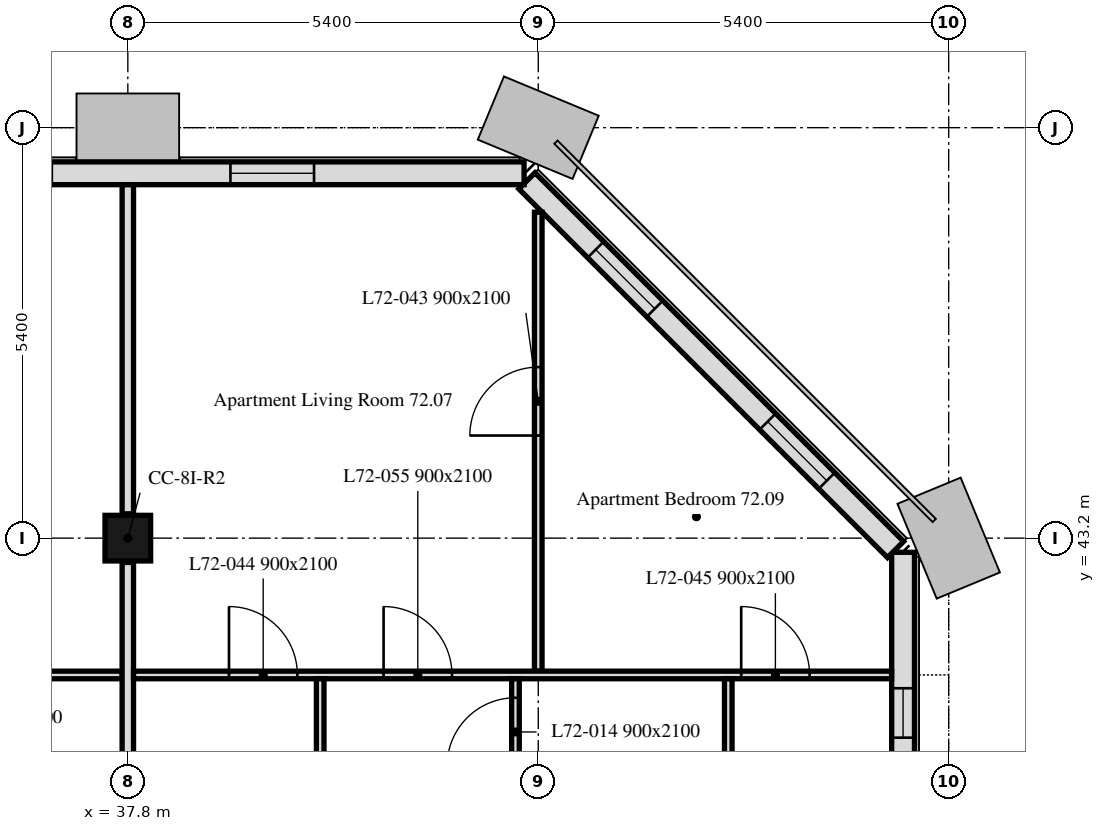
"""IFC4 building model, lengths in metres.
Left out: names, types, materials, properties, quantities, classifications, styles, units other than length and angle.
Written with IfcOpenShell. Run it as: python <this file> out.ifc"""

import sys

from ifc_helpers import new_model, si_unit, direction, frame, frame_2d, origin, origin_2d, place, context, subcontext, project, spatial, rectangle, extrude, element, fill, save


model = new_model("IFC4")
c1 = context("Model", 3, precision=1e-05, world=origin(), true_north=direction((0.0, 1.0)))
c2 = subcontext(c1, "Body", "Model", "MODEL_VIEW")
j1 = project(units=[si_unit("LENGTHUNIT", "METRE"), si_unit("PLANEANGLEUNIT", "RADIAN")], contexts=[c1])
p1 = place(None, origin())
s1 = spatial("IfcSite", under=j1, at=p1, CompositionType="ELEMENT")
p2 = place(p1, origin())
s2 = spatial("IfcBuilding", under=s1, at=p2, CompositionType="ELEMENT")
p3 = place(p2, frame((0.0, 0.0, 291.7)))
s3 = spatial("IfcBuildingStorey", under=s2, at=p3, CompositionType="ELEMENT", Elevation=291.7)
p4 = place(p3, frame((37.8, 43.2, 0.0), z_axis=(0.0, 0.0, 1.0), x_axis=(1.0, 0.0, 0.0)))
e1 = element("IfcColumn", 1, at=p4, inside=s3, PredefinedType="COLUMN", context=c2, shape_type="SweptSolid", body=[
    extrude(rectangle(XDim=0.6, YDim=0.6, at=origin_2d()), origin(), (0.0, 0.0, 1.0), 3.0),
])
p5 = place(p3, frame((48.0, 10.986, 0.0), z_axis=(0.0, 0.0, 1.0), x_axis=(0.0, 1.0, 0.0)))
e2 = element("IfcWall", 2, at=p5, inside=s3, PredefinedType="SOLIDWALL", context=c2, shape_type="SweptSolid", body=[
    extrude(rectangle(XDim=32.027, YDim=0.3, at=frame_2d((16.014, 0.0))), origin(), (0.0, 0.0, 1.0), 3.0),
])
p6 = place(p5, frame((1.164, 0.0, 0.9)))
e3 = element("IfcOpeningElement", 3, at=p6, cuts=e2, PredefinedType="OPENING", context=c2, shape_type="SweptSolid", body=[
    extrude(rectangle(XDim=1.1, YDim=1.7, at=frame_2d((0.55, 0.85))), frame((0.0, 0.16, 0.0), z_axis=(0.0, -1.0, 0.0), x_axis=(1.0, 0.0, 0.0)), (0.0, 0.0, 1.0), 0.32),
])
p7 = place(p5, frame((3.114, 0.0, 0.9)))
e4 = element("IfcOpeningElement", 4, at=p7, cuts=e2, PredefinedType="OPENING", context=c2, shape_type="SweptSolid", body=[
    extrude(rectangle(XDim=1.1, YDim=1.7, at=frame_2d((0.55, 0.85))), frame((0.0, 0.16, 0.0), z_axis=(0.0, -1.0, 0.0), x_axis=(1.0, 0.0, 0.0)), (0.0, 0.0, 1.0), 0.32),
])
p8 = place(p5, frame((6.214, 0.0, 0.9)))
e5 = element("IfcOpeningElement", 5, at=p8, cuts=e2, PredefinedType="OPENING", context=c2, shape_type="SweptSolid", body=[
    extrude(rectangle(XDim=3.4, YDim=1.7, at=frame_2d((1.7, 0.85))), frame((0.0, 0.16, 0.0), z_axis=(0.0, -1.0, 0.0), x_axis=(1.0, 0.0, 0.0)), (0.0, 0.0, 1.0), 0.32),
])
p9 = place(p5, frame((11.964, 0.0, 0.9)))
e6 = element("IfcOpeningElement", 6, at=p9, cuts=e2, PredefinedType="OPENING", context=c2, shape_type="SweptSolid", body=[
    extrude(rectangle(XDim=1.1, YDim=1.7, at=frame_2d((0.55, 0.85))), frame((0.0, 0.16, 0.0), z_axis=(0.0, -1.0, 0.0), x_axis=(1.0, 0.0, 0.0)), (0.0, 0.0, 1.0), 0.32),
])
p10 = place(p5, frame((13.564, 0.0, 0.9)))
e7 = element("IfcOpeningElement", 7, at=p10, cuts=e2, PredefinedType="OPENING", context=c2, shape_type="SweptSolid", body=[
    extrude(rectangle(XDim=1.1, YDim=1.7, at=frame_2d((0.55, 0.85))), frame((0.0, 0.16, 0.0), z_axis=(0.0, -1.0, 0.0), x_axis=(1.0, 0.0, 0.0)), (0.0, 0.0, 1.0), 0.32),
])
p11 = place(p5, frame((17.014, 0.0, 0.9)))
e8 = element("IfcOpeningElement", 8, at=p11, cuts=e2, PredefinedType="OPENING", context=c2, shape_type="SweptSolid", body=[
    extrude(rectangle(XDim=3.4, YDim=1.7, at=frame_2d((1.7, 0.85))), frame((0.0, 0.16, 0.0), z_axis=(0.0, -1.0, 0.0), x_axis=(1.0, 0.0, 0.0)), (0.0, 0.0, 1.0), 0.32),
])
p12 = place(p5, frame((22.839, 0.0, 0.9)))
e9 = element("IfcOpeningElement", 9, at=p12, cuts=e2, PredefinedType="OPENING", context=c2, shape_type="SweptSolid", body=[
    extrude(rectangle(XDim=0.65, YDim=1.7, at=frame_2d((0.325, 0.85))), frame((0.0, 0.16, 0.0), z_axis=(0.0, -1.0, 0.0), x_axis=(1.0, 0.0, 0.0)), (0.0, 0.0, 1.0), 0.32),
])
p13 = place(p5, frame((24.364, 0.0, 0.9)))
e10 = element("IfcOpeningElement", 10, at=p13, cuts=e2, PredefinedType="OPENING", context=c2, shape_type="SweptSolid", body=[
    extrude(rectangle(XDim=1.1, YDim=1.7, at=frame_2d((0.55, 0.85))), frame((0.0, 0.16, 0.0), z_axis=(0.0, -1.0, 0.0), x_axis=(1.0, 0.0, 0.0)), (0.0, 0.0, 1.0), 0.32),
])
p14 = place(p5, frame((28.164, 0.0, 0.9)))
e11 = element("IfcOpeningElement", 11, at=p14, cuts=e2, PredefinedType="OPENING", context=c2, shape_type="SweptSolid", body=[
    extrude(rectangle(XDim=1.1, YDim=1.7, at=frame_2d((0.55, 0.85))), frame((0.0, 0.16, 0.0), z_axis=(0.0, -1.0, 0.0), x_axis=(1.0, 0.0, 0.0)), (0.0, 0.0, 1.0), 0.32),
])
p15 = place(p5, frame((29.589, 0.0, 0.9)))
e12 = element("IfcOpeningElement", 12, at=p15, cuts=e2, PredefinedType="OPENING", context=c2, shape_type="SweptSolid", body=[
    extrude(rectangle(XDim=0.65, YDim=1.7, at=frame_2d((0.325, 0.85))), frame((0.0, 0.16, 0.0), z_axis=(0.0, -1.0, 0.0), x_axis=(1.0, 0.0, 0.0)), (0.0, 0.0, 1.0), 0.32),
])
p16 = place(p3, frame((47.901, 43.051, 0.0), z_axis=(0.0, 0.0, 1.0), x_axis=(-0.707106781187, 0.707106781187, 0.0)))
e13 = element("IfcWall", 13, at=p16, inside=s3, PredefinedType="SOLIDWALL", context=c2, shape_type="SweptSolid", body=[
    extrude(rectangle(XDim=6.86, YDim=0.3, at=frame_2d((3.43, 0.0))), origin(), (0.0, 0.0, 1.0), 3.0),
])
p17 = place(p16, frame((1.28, 0.0, 0.9)))
e14 = element("IfcOpeningElement", 14, at=p17, cuts=e13, PredefinedType="OPENING", context=c2, shape_type="SweptSolid", body=[
    extrude(rectangle(XDim=1.1, YDim=1.7, at=frame_2d((0.55, 0.85))), frame((0.0, 0.16, 0.0), z_axis=(0.0, -1.0, 0.0), x_axis=(1.0, 0.0, 0.0)), (0.0, 0.0, 1.0), 0.32),
])
p18 = place(p16, frame((4.48, 0.0, 0.9)))
e15 = element("IfcOpeningElement", 15, at=p18, cuts=e13, PredefinedType="OPENING", context=c2, shape_type="SweptSolid", body=[
    extrude(rectangle(XDim=1.1, YDim=1.7, at=frame_2d((0.55, 0.85))), frame((0.0, 0.16, 0.0), z_axis=(0.0, -1.0, 0.0), x_axis=(1.0, 0.0, 0.0)), (0.0, 0.0, 1.0), 0.32),
])
p19 = place(p3, frame((43.014, 48.0, 0.0), z_axis=(0.0, 0.0, 1.0), x_axis=(-1.0, 0.0, 0.0)))
e16 = element("IfcWall", 16, at=p19, inside=s3, PredefinedType="SOLIDWALL", context=c2, shape_type="SweptSolid", body=[
    extrude(rectangle(XDim=32.027, YDim=0.3, at=frame_2d((16.014, 0.0))), origin(), (0.0, 0.0, 1.0), 3.0),
])
p20 = place(p19, frame((2.764, 0.0, 0.9)))
e17 = element("IfcOpeningElement", 17, at=p20, cuts=e16, PredefinedType="OPENING", context=c2, shape_type="SweptSolid", body=[
    extrude(rectangle(XDim=1.1, YDim=1.7, at=frame_2d((0.55, 0.85))), frame((0.0, 0.16, 0.0), z_axis=(0.0, -1.0, 0.0), x_axis=(1.0, 0.0, 0.0)), (0.0, 0.0, 1.0), 0.32),
])
p21 = place(p19, frame((6.214, 0.0, 0.9)))
e18 = element("IfcOpeningElement", 18, at=p21, cuts=e16, PredefinedType="OPENING", context=c2, shape_type="SweptSolid", body=[
    extrude(rectangle(XDim=3.4, YDim=1.7, at=frame_2d((1.7, 0.85))), frame((0.0, 0.16, 0.0), z_axis=(0.0, -1.0, 0.0), x_axis=(1.0, 0.0, 0.0)), (0.0, 0.0, 1.0), 0.32),
])
p22 = place(p19, frame((13.564, 0.0, 0.9)))
e19 = element("IfcOpeningElement", 19, at=p22, cuts=e16, PredefinedType="OPENING", context=c2, shape_type="SweptSolid", body=[
    extrude(rectangle(XDim=1.1, YDim=1.7, at=frame_2d((0.55, 0.85))), frame((0.0, 0.16, 0.0), z_axis=(0.0, -1.0, 0.0), x_axis=(1.0, 0.0, 0.0)), (0.0, 0.0, 1.0), 0.32),
])
p23 = place(p19, frame((17.014, 0.0, 0.9)))
e20 = element("IfcOpeningElement", 20, at=p23, cuts=e16, PredefinedType="OPENING", context=c2, shape_type="SweptSolid", body=[
    extrude(rectangle(XDim=3.4, YDim=1.7, at=frame_2d((1.7, 0.85))), frame((0.0, 0.16, 0.0), z_axis=(0.0, -1.0, 0.0), x_axis=(1.0, 0.0, 0.0)), (0.0, 0.0, 1.0), 0.32),
])
p24 = place(p19, frame((24.364, 0.0, 0.9)))
e21 = element("IfcOpeningElement", 21, at=p24, cuts=e16, PredefinedType="OPENING", context=c2, shape_type="SweptSolid", body=[
    extrude(rectangle(XDim=1.1, YDim=1.7, at=frame_2d((0.55, 0.85))), frame((0.0, 0.16, 0.0), z_axis=(0.0, -1.0, 0.0), x_axis=(1.0, 0.0, 0.0)), (0.0, 0.0, 1.0), 0.32),
])
p25 = place(p19, frame((27.814, 0.0, 0.9)))
e22 = element("IfcOpeningElement", 22, at=p25, cuts=e16, PredefinedType="OPENING", context=c2, shape_type="SweptSolid", body=[
    extrude(rectangle(XDim=3.4, YDim=1.7, at=frame_2d((1.7, 0.85))), frame((0.0, 0.16, 0.0), z_axis=(0.0, -1.0, 0.0), x_axis=(1.0, 0.0, 0.0)), (0.0, 0.0, 1.0), 0.32),
])
p26 = place(p3, frame((32.37, 41.4, 0.0), z_axis=(0.0, 0.0, 1.0), x_axis=(1.0, 0.0, 0.0)))
e23 = element("IfcWall", 23, at=p26, inside=s3, PredefinedType="PARTITIONING", context=c2, shape_type="SweptSolid", body=[
    extrude(rectangle(XDim=5.355, YDim=0.1, at=frame_2d((2.677, 0.0))), origin(), (0.0, 0.0, 1.0), 3.0),
])
p27 = place(p26, frame((2.578, 0.0, 0.0)))
e24 = element("IfcOpeningElement", 24, at=p27, cuts=e23, PredefinedType="OPENING", context=c2, shape_type="SweptSolid", body=[
    extrude(rectangle(XDim=0.9, YDim=2.1, at=frame_2d((0.45, 1.05))), frame((0.0, 0.05, 0.0), z_axis=(0.0, -1.0, 0.0), x_axis=(1.0, 0.0, 0.0)), (0.0, 0.0, 1.0), 0.1),
])
p28 = place(p3, frame((37.8, 43.52, 0.0), z_axis=(0.0, 0.0, 1.0), x_axis=(0.0, 1.0, 0.0)))
e25 = element("IfcWall", 25, at=p28, inside=s3, PredefinedType="PARTITIONING", context=c2, shape_type="SweptSolid", body=[
    extrude(rectangle(XDim=4.329, YDim=0.15, at=frame_2d((2.165, 0.0))), origin(), (0.0, 0.0, 1.0), 2.4),
])
p29 = place(p3, frame((37.8, 38.12, 0.0), z_axis=(0.0, 0.0, 1.0), x_axis=(0.0, 1.0, 0.0)))
e26 = element("IfcWall", 26, at=p29, inside=s3, PredefinedType="PARTITIONING", context=c2, shape_type="SweptSolid", body=[
    extrude(rectangle(XDim=4.76, YDim=0.15, at=frame_2d((2.38, 0.0))), origin(), (0.0, 0.0, 1.0), 2.4),
])
p30 = place(p3, frame((43.2, 41.45, 0.0), z_axis=(0.0, 0.0, 1.0), x_axis=(0.0, 1.0, 0.0)))
e27 = element("IfcWall", 27, at=p30, inside=s3, PredefinedType="PARTITIONING", context=c2, shape_type="SweptSolid", body=[
    extrude(rectangle(XDim=6.038, YDim=0.1, at=frame_2d((3.019, 0.0))), origin(), (0.0, 0.0, 1.0), 3.0),
])
p31 = place(p30, frame((3.1, 0.0, 0.0)))
e28 = element("IfcOpeningElement", 28, at=p31, cuts=e27, PredefinedType="OPENING", context=c2, shape_type="SweptSolid", body=[
    extrude(rectangle(XDim=0.9, YDim=2.1, at=frame_2d((0.45, 1.05))), frame((0.0, 0.05, 0.0), z_axis=(0.0, -1.0, 0.0), x_axis=(1.0, 0.0, 0.0)), (0.0, 0.0, 1.0), 0.1),
])
p32 = place(p3, frame((37.875, 41.4, 0.0), z_axis=(0.0, 0.0, 1.0), x_axis=(1.0, 0.0, 0.0)))
e29 = element("IfcWall", 29, at=p32, inside=s3, PredefinedType="PARTITIONING", context=c2, shape_type="SweptSolid", body=[
    extrude(rectangle(XDim=9.974, YDim=0.1, at=frame_2d((4.987, 0.0))), origin(), (0.0, 0.0, 1.0), 3.0),
])
p33 = place(p32, frame((1.256, 0.0, 0.0)))
e30 = element("IfcOpeningElement", 30, at=p33, cuts=e29, PredefinedType="OPENING", context=c2, shape_type="SweptSolid", body=[
    extrude(rectangle(XDim=0.9, YDim=2.1, at=frame_2d((0.45, 1.05))), frame((0.0, 0.05, 0.0), z_axis=(0.0, -1.0, 0.0), x_axis=(1.0, 0.0, 0.0)), (0.0, 0.0, 1.0), 0.1),
])
p34 = place(p32, frame((7.995, 0.0, 0.0)))
e31 = element("IfcOpeningElement", 31, at=p34, cuts=e29, PredefinedType="OPENING", context=c2, shape_type="SweptSolid", body=[
    extrude(rectangle(XDim=0.9, YDim=2.1, at=frame_2d((0.45, 1.05))), frame((0.0, 0.05, 0.0), z_axis=(0.0, -1.0, 0.0), x_axis=(1.0, 0.0, 0.0)), (0.0, 0.0, 1.0), 0.1),
])
p35 = place(p32, frame((3.29, 0.0, 0.0)))
e32 = element("IfcOpeningElement", 32, at=p35, cuts=e29, PredefinedType="OPENING", context=c2, shape_type="SweptSolid", body=[
    extrude(rectangle(XDim=0.9, YDim=2.1, at=frame_2d((0.45, 1.05))), frame((0.0, 0.05, 0.0), z_axis=(0.0, -1.0, 0.0), x_axis=(1.0, 0.0, 0.0)), (0.0, 0.0, 1.0), 0.1),
])
p36 = place(p3, frame((40.331, 34.725, 0.0), z_axis=(0.0, 0.0, 1.0), x_axis=(0.0, 1.0, 0.0)))
e33 = element("IfcWall", 33, at=p36, inside=s3, PredefinedType="PARTITIONING", context=c2, shape_type="SweptSolid", body=[
    extrude(rectangle(XDim=6.625, YDim=0.1, at=frame_2d((3.312, 0.0))), origin(), (0.0, 0.0, 1.0), 2.4),
])
p37 = place(p36, frame((0.725, 0.0, 0.0)))
e34 = element("IfcOpeningElement", 34, at=p37, cuts=e33, PredefinedType="OPENING", context=c2, shape_type="SweptSolid", body=[
    extrude(rectangle(XDim=0.9, YDim=2.1, at=frame_2d((0.45, 1.05))), frame((0.0, 0.05, 0.0), z_axis=(0.0, -1.0, 0.0), x_axis=(1.0, 0.0, 0.0)), (0.0, 0.0, 1.0), 0.1),
])
p38 = place(p36, frame((4.329, 0.0, 0.0)))
e35 = element("IfcOpeningElement", 35, at=p38, cuts=e33, PredefinedType="OPENING", context=c2, shape_type="SweptSolid", body=[
    extrude(rectangle(XDim=0.9, YDim=2.1, at=frame_2d((0.45, 1.05))), frame((0.0, 0.05, 0.0), z_axis=(0.0, -1.0, 0.0), x_axis=(1.0, 0.0, 0.0)), (0.0, 0.0, 1.0), 0.1),
])
p39 = place(p3, frame((42.9, 38.12, 0.0), z_axis=(0.0, 0.0, 1.0), x_axis=(0.0, 1.0, 0.0)))
e36 = element("IfcWall", 36, at=p39, inside=s3, PredefinedType="PARTITIONING", context=c2, shape_type="SweptSolid", body=[
    extrude(rectangle(XDim=3.23, YDim=0.1, at=frame_2d((1.615, 0.0))), origin(), (0.0, 0.0, 1.0), 3.0),
])
p40 = place(p39, frame((2.08, 0.0, 0.0)))
e37 = element("IfcOpeningElement", 37, at=p40, cuts=e36, PredefinedType="OPENING", context=c2, shape_type="SweptSolid", body=[
    extrude(rectangle(XDim=0.9, YDim=2.1, at=frame_2d((0.45, 1.05))), frame((0.0, 0.05, 0.0), z_axis=(0.0, -1.0, 0.0), x_axis=(1.0, 0.0, 0.0)), (0.0, 0.0, 1.0), 0.1),
])
p41 = place(p3, frame((45.7, 37.2, 0.0), z_axis=(0.0, 0.0, 1.0), x_axis=(0.0, 1.0, 0.0)))
e38 = element("IfcWall", 38, at=p41, inside=s3, PredefinedType="PARTITIONING", context=c2, shape_type="SweptSolid", body=[
    extrude(rectangle(XDim=4.15, YDim=0.1, at=frame_2d((2.075, 0.0))), origin(), (0.0, 0.0, 1.0), 2.4),
])
p42 = place(p15, origin())
e39 = element("IfcWindow", 39, at=p42, inside=s3, PartitioningType="SINGLE_PANEL", PredefinedType="WINDOW", context=c2, shape_type="SweptSolid", body=[
    extrude(rectangle(XDim=0.65, YDim=1.7, at=frame_2d((0.325, 0.85))), frame((0.0, 0.03, 0.0), z_axis=(0.0, -1.0, 0.0), x_axis=(1.0, 0.0, 0.0)), (0.0, 0.0, 1.0), 0.06),
])
fill(e12, e39)
p43 = place(p17, origin())
e40 = element("IfcWindow", 40, at=p43, inside=s3, PartitioningType="SINGLE_PANEL", PredefinedType="WINDOW", context=c2, shape_type="SweptSolid", body=[
    extrude(rectangle(XDim=1.1, YDim=1.7, at=frame_2d((0.55, 0.85))), frame((0.0, 0.03, 0.0), z_axis=(0.0, -1.0, 0.0), x_axis=(1.0, 0.0, 0.0)), (0.0, 0.0, 1.0), 0.06),
])
fill(e14, e40)
p44 = place(p18, origin())
e41 = element("IfcWindow", 41, at=p44, inside=s3, PartitioningType="SINGLE_PANEL", PredefinedType="WINDOW", context=c2, shape_type="SweptSolid", body=[
    extrude(rectangle(XDim=1.1, YDim=1.7, at=frame_2d((0.55, 0.85))), frame((0.0, 0.03, 0.0), z_axis=(0.0, -1.0, 0.0), x_axis=(1.0, 0.0, 0.0)), (0.0, 0.0, 1.0), 0.06),
])
fill(e15, e41)
p45 = place(p20, origin())
e42 = element("IfcWindow", 42, at=p45, inside=s3, PartitioningType="SINGLE_PANEL", PredefinedType="WINDOW", context=c2, shape_type="SweptSolid", body=[
    extrude(rectangle(XDim=1.1, YDim=1.7, at=frame_2d((0.55, 0.85))), frame((0.0, 0.03, 0.0), z_axis=(0.0, -1.0, 0.0), x_axis=(1.0, 0.0, 0.0)), (0.0, 0.0, 1.0), 0.06),
])
fill(e17, e42)
p46 = place(p40, origin())
e43 = element("IfcDoor", 43, at=p46, inside=s3, OperationType="SINGLE_SWING_LEFT", PredefinedType="DOOR", context=c2, shape_type="SweptSolid", body=[
    extrude(rectangle(XDim=0.9, YDim=2.1, at=frame_2d((0.45, 1.05))), frame((0.0, 0.025, 0.0), z_axis=(0.0, -1.0, 0.0), x_axis=(1.0, 0.0, 0.0)), (0.0, 0.0, 1.0), 0.05),
])
fill(e37, e43)
p47 = place(p31, origin())
e44 = element("IfcDoor", 44, at=p47, inside=s3, OperationType="SINGLE_SWING_RIGHT", PredefinedType="DOOR", context=c2, shape_type="SweptSolid", body=[
    extrude(rectangle(XDim=0.9, YDim=2.1, at=frame_2d((0.45, 1.05))), frame((0.0, 0.025, 0.0), z_axis=(0.0, -1.0, 0.0), x_axis=(1.0, 0.0, 0.0)), (0.0, 0.0, 1.0), 0.05),
])
fill(e28, e44)
p48 = place(p33, origin())
e45 = element("IfcDoor", 45, at=p48, inside=s3, OperationType="SINGLE_SWING_RIGHT", PredefinedType="DOOR", context=c2, shape_type="SweptSolid", body=[
    extrude(rectangle(XDim=0.9, YDim=2.1, at=frame_2d((0.45, 1.05))), frame((0.0, 0.025, 0.0), z_axis=(0.0, -1.0, 0.0), x_axis=(1.0, 0.0, 0.0)), (0.0, 0.0, 1.0), 0.05),
])
fill(e30, e45)
p49 = place(p34, origin())
e46 = element("IfcDoor", 46, at=p49, inside=s3, OperationType="SINGLE_SWING_LEFT", PredefinedType="DOOR", context=c2, shape_type="SweptSolid", body=[
    extrude(rectangle(XDim=0.9, YDim=2.1, at=frame_2d((0.45, 1.05))), frame((0.0, 0.025, 0.0), z_axis=(0.0, -1.0, 0.0), x_axis=(1.0, 0.0, 0.0)), (0.0, 0.0, 1.0), 0.05),
])
fill(e31, e46)
p50 = place(p35, origin())
e47 = element("IfcDoor", 47, at=p50, inside=s3, OperationType="SINGLE_SWING_LEFT", PredefinedType="DOOR", context=c2, shape_type="SweptSolid", body=[
    extrude(rectangle(XDim=0.9, YDim=2.1, at=frame_2d((0.45, 1.05))), frame((0.0, 0.025, 0.0), z_axis=(0.0, -1.0, 0.0), x_axis=(1.0, 0.0, 0.0)), (0.0, 0.0, 1.0), 0.05),
])
fill(e32, e47)
save(model, sys.argv[1])
